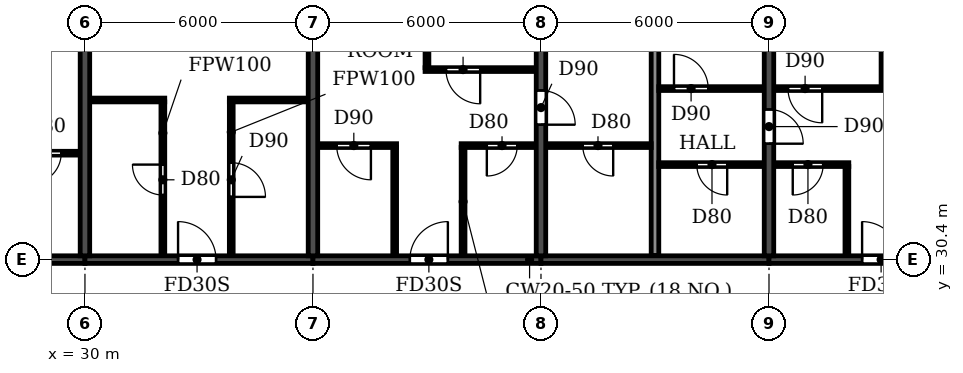
"""IFC4 building model, lengths in metres.
Left out: names, types, materials, properties, quantities, classifications, styles, units other than length and angle.
Written with IfcOpenShell. Run it as: python <this file> out.ifc"""

import sys

from ifc_helpers import new_model, si_unit, direction, frame, frame_2d, origin, place, context, subcontext, project, spatial, rectangle, extrude, element, fill, save


model = new_model("IFC4")
c1 = context("Model", 3, precision=1e-05, world=origin(), true_north=direction((0.0, 1.0)))
c2 = subcontext(c1, "Body", "Model", "MODEL_VIEW")
j1 = project(units=[si_unit("LENGTHUNIT", "METRE"), si_unit("PLANEANGLEUNIT", "RADIAN")], contexts=[c1])
p1 = place(None, origin())
s1 = spatial("IfcSite", under=j1, at=p1, CompositionType="ELEMENT")
p2 = place(p1, origin())
s2 = spatial("IfcBuilding", under=s1, at=p2, CompositionType="ELEMENT")
p3 = place(p2, frame((0.0, 0.0, 201.6)))
s3 = spatial("IfcBuildingStorey", under=s2, at=p3, CompositionType="ELEMENT", Elevation=201.6)
for number, where, z_axis, x_axis in (
    (1, (30.0, 30.5, 0.0), (0.0, 0.0, 1.0), (0.0, 1.0, 0.0)),
    (2, (36.0, 30.5, 0.0), (0.0, 0.0, 1.0), (0.0, 1.0, 0.0)),
):
    element("IfcWall", number, at=place(p3, frame(where, z_axis=z_axis, x_axis=x_axis)), inside=s3, PredefinedType="SHEAR", context=c2, shape_type="SweptSolid", body=[
        extrude(rectangle(XDim=10.5, YDim=0.25, at=frame_2d((5.25, 0.0))), origin(), (0.0, 0.0, 1.0), 3.08),
    ])
p4 = place(p3, frame((42.0, 30.5, 0.0), z_axis=(0.0, 0.0, 1.0), x_axis=(0.0, 1.0, 0.0)))
e3 = element("IfcWall", 3, at=p4, inside=s3, PredefinedType="SHEAR", context=c2, shape_type="SweptSolid", body=[
    extrude(rectangle(XDim=10.5, YDim=0.25, at=frame_2d((5.25, 0.0))), origin(), (0.0, 0.0, 1.0), 3.08),
])
p5 = place(p4, frame((3.45, 0.0, 0.0)))
e4 = element("IfcOpeningElement", 4, at=p5, cuts=e3, PredefinedType="OPENING", context=c2, shape_type="SweptSolid", body=[
    extrude(rectangle(XDim=0.9, YDim=2.1, at=frame_2d((0.45, 1.05))), frame((0.0, 0.135, 0.0), z_axis=(0.0, -1.0, 0.0), x_axis=(1.0, 0.0, 0.0)), (0.0, 0.0, 1.0), 0.27),
])
p6 = place(p3, frame((48.0, 30.5, 0.0), z_axis=(0.0, 0.0, 1.0), x_axis=(0.0, 1.0, 0.0)))
e5 = element("IfcWall", 5, at=p6, inside=s3, PredefinedType="SHEAR", context=c2, shape_type="SweptSolid", body=[
    extrude(rectangle(XDim=10.5, YDim=0.25, at=frame_2d((5.25, 0.0))), origin(), (0.0, 0.0, 1.0), 3.08),
])
p7 = place(p6, frame((2.95, 0.0, 0.0)))
e6 = element("IfcOpeningElement", 6, at=p7, cuts=e5, PredefinedType="OPENING", context=c2, shape_type="SweptSolid", body=[
    extrude(rectangle(XDim=0.9, YDim=2.1, at=frame_2d((0.45, 1.05))), frame((0.0, 0.135, 0.0), z_axis=(0.0, -1.0, 0.0), x_axis=(1.0, 0.0, 0.0)), (0.0, 0.0, 1.0), 0.27),
])
p8 = place(p3, frame((24.0, 30.4, 0.0), z_axis=(0.0, 0.0, 1.0), x_axis=(1.0, 0.0, 0.0)))
e7 = element("IfcWall", 7, at=p8, inside=s3, PredefinedType="SHEAR", context=c2, shape_type="SweptSolid", body=[
    extrude(rectangle(XDim=6.0, YDim=0.2, at=frame_2d((3.0, 0.0))), origin(), (0.0, 0.0, 1.0), 2.48),
])
p9 = place(p8, frame((2.55, 0.0, 0.0)))
e8 = element("IfcOpeningElement", 8, at=p9, cuts=e7, PredefinedType="OPENING", context=c2, shape_type="SweptSolid", body=[
    extrude(rectangle(XDim=1.0, YDim=2.1, at=frame_2d((0.5, 1.05))), frame((0.0, 0.11, 0.0), z_axis=(0.0, -1.0, 0.0), x_axis=(1.0, 0.0, 0.0)), (0.0, 0.0, 1.0), 0.22),
])
p10 = place(p3, frame((30.0, 30.4, 0.0), z_axis=(0.0, 0.0, 1.0), x_axis=(1.0, 0.0, 0.0)))
e9 = element("IfcWall", 9, at=p10, inside=s3, PredefinedType="SHEAR", context=c2, shape_type="SweptSolid", body=[
    extrude(rectangle(XDim=6.0, YDim=0.2, at=frame_2d((3.0, 0.0))), origin(), (0.0, 0.0, 1.0), 2.48),
])
p11 = place(p10, frame((2.45, 0.0, 0.0)))
e10 = element("IfcOpeningElement", 10, at=p11, cuts=e9, PredefinedType="OPENING", context=c2, shape_type="SweptSolid", body=[
    extrude(rectangle(XDim=1.0, YDim=2.1, at=frame_2d((0.5, 1.05))), frame((0.0, 0.11, 0.0), z_axis=(0.0, -1.0, 0.0), x_axis=(1.0, 0.0, 0.0)), (0.0, 0.0, 1.0), 0.22),
])
p12 = place(p3, frame((36.0, 30.4, 0.0), z_axis=(0.0, 0.0, 1.0), x_axis=(1.0, 0.0, 0.0)))
e11 = element("IfcWall", 11, at=p12, inside=s3, PredefinedType="SHEAR", context=c2, shape_type="SweptSolid", body=[
    extrude(rectangle(XDim=6.0, YDim=0.2, at=frame_2d((3.0, 0.0))), origin(), (0.0, 0.0, 1.0), 2.48),
])
p13 = place(p12, frame((2.55, 0.0, 0.0)))
e12 = element("IfcOpeningElement", 12, at=p13, cuts=e11, PredefinedType="OPENING", context=c2, shape_type="SweptSolid", body=[
    extrude(rectangle(XDim=1.0, YDim=2.1, at=frame_2d((0.5, 1.05))), frame((0.0, 0.11, 0.0), z_axis=(0.0, -1.0, 0.0), x_axis=(1.0, 0.0, 0.0)), (0.0, 0.0, 1.0), 0.22),
])
p14 = place(p3, frame((42.0, 30.4, 0.0), z_axis=(0.0, 0.0, 1.0), x_axis=(1.0, 0.0, 0.0)))
e13 = element("IfcWall", 13, at=p14, inside=s3, PredefinedType="SHEAR", context=c2, shape_type="SweptSolid", body=[
    extrude(rectangle(XDim=6.0, YDim=0.2, at=frame_2d((3.0, 0.0))), origin(), (0.0, 0.0, 1.0), 2.48),
])
p15 = place(p3, frame((48.0, 30.4, 0.0), z_axis=(0.0, 0.0, 1.0), x_axis=(1.0, 0.0, 0.0)))
e14 = element("IfcWall", 14, at=p15, inside=s3, PredefinedType="SHEAR", context=c2, shape_type="SweptSolid", body=[
    extrude(rectangle(XDim=6.0, YDim=0.2, at=frame_2d((3.0, 0.0))), origin(), (0.0, 0.0, 1.0), 2.48),
])
p16 = place(p15, frame((2.45, 0.0, 0.0)))
e15 = element("IfcOpeningElement", 15, at=p16, cuts=e14, PredefinedType="OPENING", context=c2, shape_type="SweptSolid", body=[
    extrude(rectangle(XDim=1.0, YDim=2.1, at=frame_2d((0.5, 1.05))), frame((0.0, 0.11, 0.0), z_axis=(0.0, -1.0, 0.0), x_axis=(1.0, 0.0, 0.0)), (0.0, 0.0, 1.0), 0.22),
])
p17 = place(p3, frame((45.0, 30.51, 0.0), z_axis=(0.0, 0.0, 1.0), x_axis=(0.0, 1.0, 0.0)))
e16 = element("IfcWall", 16, at=p17, inside=s3, PredefinedType="PARTITIONING", context=c2, shape_type="SweptSolid", body=[
    extrude(rectangle(XDim=10.63, YDim=0.2, at=frame_2d((5.315, 0.0))), origin(), (0.0, 0.0, 1.0), 3.08),
])
p18 = place(p3, frame((45.1, 32.9, 0.0), z_axis=(0.0, 0.0, 1.0), x_axis=(1.0, 0.0, 0.0)))
e17 = element("IfcWall", 17, at=p18, inside=s3, PredefinedType="PARTITIONING", context=c2, shape_type="SweptSolid", body=[
    extrude(rectangle(XDim=2.765, YDim=0.1, at=frame_2d((1.382, 0.0))), origin(), (0.0, 0.0, 1.0), 3.08),
])
p19 = place(p18, frame((1.0, 0.0, 0.0)))
e18 = element("IfcOpeningElement", 18, at=p19, cuts=e17, PredefinedType="OPENING", context=c2, shape_type="SweptSolid", body=[
    extrude(rectangle(XDim=0.8, YDim=2.1, at=frame_2d((0.4, 1.05))), frame((0.0, 0.06, 0.0), z_axis=(0.0, -1.0, 0.0), x_axis=(1.0, 0.0, 0.0)), (0.0, 0.0, 1.0), 0.12),
])
p20 = place(p3, frame((48.135, 32.9, 0.0), z_axis=(0.0, 0.0, 1.0), x_axis=(1.0, 0.0, 0.0)))
e19 = element("IfcWall", 19, at=p20, inside=s3, PredefinedType="PARTITIONING", context=c2, shape_type="SweptSolid", body=[
    extrude(rectangle(XDim=1.965, YDim=0.1, at=frame_2d((0.982, 0.0))), origin(), (0.0, 0.0, 1.0), 3.08),
])
p21 = place(p20, frame((0.49, 0.0, 0.0)))
e20 = element("IfcOpeningElement", 20, at=p21, cuts=e19, PredefinedType="OPENING", context=c2, shape_type="SweptSolid", body=[
    extrude(rectangle(XDim=0.8, YDim=2.1, at=frame_2d((0.4, 1.05))), frame((0.0, 0.06, 0.0), z_axis=(0.0, -1.0, 0.0), x_axis=(1.0, 0.0, 0.0)), (0.0, 0.0, 1.0), 0.12),
])
p22 = place(p3, frame((27.9, 33.2, 0.0), z_axis=(0.0, 0.0, 1.0), x_axis=(1.0, 0.0, 0.0)))
e21 = element("IfcWall", 21, at=p22, inside=s3, PredefinedType="PARTITIONING", context=c2, shape_type="SweptSolid", body=[
    extrude(rectangle(XDim=1.965, YDim=0.1, at=frame_2d((0.982, 0.0))), origin(), (0.0, 0.0, 1.0), 3.08),
])
p23 = place(p22, frame((0.675, 0.0, 0.0)))
e22 = element("IfcOpeningElement", 22, at=p23, cuts=e21, PredefinedType="OPENING", context=c2, shape_type="SweptSolid", body=[
    extrude(rectangle(XDim=0.8, YDim=2.1, at=frame_2d((0.4, 1.05))), frame((0.0, 0.06, 0.0), z_axis=(0.0, -1.0, 0.0), x_axis=(1.0, 0.0, 0.0)), (0.0, 0.0, 1.0), 0.12),
])
p24 = place(p3, frame((36.135, 33.4, 0.0), z_axis=(0.0, 0.0, 1.0), x_axis=(1.0, 0.0, 0.0)))
e23 = element("IfcWall", 23, at=p24, inside=s3, PredefinedType="PARTITIONING", context=c2, shape_type="SweptSolid", body=[
    extrude(rectangle(XDim=2.065, YDim=0.1, at=frame_2d((1.032, 0.0))), origin(), (0.0, 0.0, 1.0), 3.08),
])
p25 = place(p24, frame((0.49, 0.0, 0.0)))
e24 = element("IfcOpeningElement", 24, at=p25, cuts=e23, PredefinedType="OPENING", context=c2, shape_type="SweptSolid", body=[
    extrude(rectangle(XDim=0.9, YDim=2.1, at=frame_2d((0.45, 1.05))), frame((0.0, 0.06, 0.0), z_axis=(0.0, -1.0, 0.0), x_axis=(1.0, 0.0, 0.0)), (0.0, 0.0, 1.0), 0.12),
])
p26 = place(p3, frame((39.9, 33.4, 0.0), z_axis=(0.0, 0.0, 1.0), x_axis=(1.0, 0.0, 0.0)))
e25 = element("IfcWall", 25, at=p26, inside=s3, PredefinedType="PARTITIONING", context=c2, shape_type="SweptSolid", body=[
    extrude(rectangle(XDim=1.965, YDim=0.1, at=frame_2d((0.982, 0.0))), origin(), (0.0, 0.0, 1.0), 3.08),
])
p27 = place(p26, frame((0.675, 0.0, 0.0)))
e26 = element("IfcOpeningElement", 26, at=p27, cuts=e25, PredefinedType="OPENING", context=c2, shape_type="SweptSolid", body=[
    extrude(rectangle(XDim=0.8, YDim=2.1, at=frame_2d((0.4, 1.05))), frame((0.0, 0.06, 0.0), z_axis=(0.0, -1.0, 0.0), x_axis=(1.0, 0.0, 0.0)), (0.0, 0.0, 1.0), 0.12),
])
p28 = place(p3, frame((42.135, 33.4, 0.0), z_axis=(0.0, 0.0, 1.0), x_axis=(1.0, 0.0, 0.0)))
e27 = element("IfcWall", 27, at=p28, inside=s3, PredefinedType="PARTITIONING", context=c2, shape_type="SweptSolid", body=[
    extrude(rectangle(XDim=2.765, YDim=0.1, at=frame_2d((1.382, 0.0))), origin(), (0.0, 0.0, 1.0), 3.08),
])
p29 = place(p28, frame((0.965, 0.0, 0.0)))
e28 = element("IfcOpeningElement", 28, at=p29, cuts=e27, PredefinedType="OPENING", context=c2, shape_type="SweptSolid", body=[
    extrude(rectangle(XDim=0.8, YDim=2.1, at=frame_2d((0.4, 1.05))), frame((0.0, 0.06, 0.0), z_axis=(0.0, -1.0, 0.0), x_axis=(1.0, 0.0, 0.0)), (0.0, 0.0, 1.0), 0.12),
])
p30 = place(p3, frame((30.135, 34.6, 0.0), z_axis=(0.0, 0.0, 1.0), x_axis=(1.0, 0.0, 0.0)))
e29 = element("IfcWall", 29, at=p30, inside=s3, PredefinedType="PARTITIONING", context=c2, shape_type="SweptSolid", body=[
    extrude(rectangle(XDim=1.965, YDim=0.1, at=frame_2d((0.982, 0.0))), origin(), (0.0, 0.0, 1.0), 3.08),
])
p31 = place(p3, frame((33.8, 34.6, 0.0), z_axis=(0.0, 0.0, 1.0), x_axis=(1.0, 0.0, 0.0)))
e30 = element("IfcWall", 30, at=p31, inside=s3, PredefinedType="PARTITIONING", context=c2, shape_type="SweptSolid", body=[
    extrude(rectangle(XDim=2.065, YDim=0.1, at=frame_2d((1.032, 0.0))), origin(), (0.0, 0.0, 1.0), 3.08),
])
p32 = place(p3, frame((45.1, 34.9, 0.0), z_axis=(0.0, 0.0, 1.0), x_axis=(1.0, 0.0, 0.0)))
e31 = element("IfcWall", 31, at=p32, inside=s3, PredefinedType="PARTITIONING", context=c2, shape_type="SweptSolid", body=[
    extrude(rectangle(XDim=2.765, YDim=0.1, at=frame_2d((1.382, 0.0))), origin(), (0.0, 0.0, 1.0), 3.08),
])
p33 = place(p32, frame((0.4, 0.0, 0.0)))
e32 = element("IfcOpeningElement", 32, at=p33, cuts=e31, PredefinedType="OPENING", context=c2, shape_type="SweptSolid", body=[
    extrude(rectangle(XDim=0.9, YDim=2.1, at=frame_2d((0.45, 1.05))), frame((0.0, 0.06, 0.0), z_axis=(0.0, -1.0, 0.0), x_axis=(1.0, 0.0, 0.0)), (0.0, 0.0, 1.0), 0.12),
])
p34 = place(p3, frame((48.135, 34.9, 0.0), z_axis=(0.0, 0.0, 1.0), x_axis=(1.0, 0.0, 0.0)))
e33 = element("IfcWall", 33, at=p34, inside=s3, PredefinedType="PARTITIONING", context=c2, shape_type="SweptSolid", body=[
    extrude(rectangle(XDim=2.915, YDim=0.1, at=frame_2d((1.458, 0.0))), origin(), (0.0, 0.0, 1.0), 3.08),
])
p35 = place(p34, frame((0.365, 0.0, 0.0)))
e34 = element("IfcOpeningElement", 34, at=p35, cuts=e33, PredefinedType="OPENING", context=c2, shape_type="SweptSolid", body=[
    extrude(rectangle(XDim=0.9, YDim=2.1, at=frame_2d((0.45, 1.05))), frame((0.0, 0.06, 0.0), z_axis=(0.0, -1.0, 0.0), x_axis=(1.0, 0.0, 0.0)), (0.0, 0.0, 1.0), 0.12),
])
p36 = place(p3, frame((38.95, 35.4, 0.0), z_axis=(0.0, 0.0, 1.0), x_axis=(1.0, 0.0, 0.0)))
e35 = element("IfcWall", 35, at=p36, inside=s3, PredefinedType="PARTITIONING", context=c2, shape_type="SweptSolid", body=[
    extrude(rectangle(XDim=2.915, YDim=0.1, at=frame_2d((1.458, 0.0))), origin(), (0.0, 0.0, 1.0), 3.08),
])
p37 = place(p36, frame((0.55, 0.0, 0.0)))
e36 = element("IfcOpeningElement", 36, at=p37, cuts=e35, PredefinedType="OPENING", context=c2, shape_type="SweptSolid", body=[
    extrude(rectangle(XDim=0.9, YDim=2.1, at=frame_2d((0.45, 1.05))), frame((0.0, 0.06, 0.0), z_axis=(0.0, -1.0, 0.0), x_axis=(1.0, 0.0, 0.0)), (0.0, 0.0, 1.0), 0.12),
])
p38 = place(p3, frame((32.05, 30.51, 0.0), z_axis=(0.0, 0.0, 1.0), x_axis=(0.0, 1.0, 0.0)))
e37 = element("IfcWall", 37, at=p38, inside=s3, PredefinedType="PARTITIONING", context=c2, shape_type="SweptSolid", body=[
    extrude(rectangle(XDim=4.04, YDim=0.1, at=frame_2d((2.02, 0.0))), origin(), (0.0, 0.0, 1.0), 3.08),
])
p39 = place(p38, frame((1.59, 0.0, 0.0)))
e38 = element("IfcOpeningElement", 38, at=p39, cuts=e37, PredefinedType="OPENING", context=c2, shape_type="SweptSolid", body=[
    extrude(rectangle(XDim=0.8, YDim=2.1, at=frame_2d((0.4, 1.05))), frame((0.0, 0.06, 0.0), z_axis=(0.0, -1.0, 0.0), x_axis=(1.0, 0.0, 0.0)), (0.0, 0.0, 1.0), 0.12),
])
p40 = place(p3, frame((33.85, 30.51, 0.0), z_axis=(0.0, 0.0, 1.0), x_axis=(0.0, 1.0, 0.0)))
e39 = element("IfcWall", 39, at=p40, inside=s3, PredefinedType="PARTITIONING", context=c2, shape_type="SweptSolid", body=[
    extrude(rectangle(XDim=4.04, YDim=0.1, at=frame_2d((2.02, 0.0))), origin(), (0.0, 0.0, 1.0), 3.08),
])
p41 = place(p40, frame((1.54, 0.0, 0.0)))
e40 = element("IfcOpeningElement", 40, at=p41, cuts=e39, PredefinedType="OPENING", context=c2, shape_type="SweptSolid", body=[
    extrude(rectangle(XDim=0.9, YDim=2.1, at=frame_2d((0.45, 1.05))), frame((0.0, 0.06, 0.0), z_axis=(0.0, -1.0, 0.0), x_axis=(1.0, 0.0, 0.0)), (0.0, 0.0, 1.0), 0.12),
])
p42 = place(p3, frame((38.15, 30.51, 0.0), z_axis=(0.0, 0.0, 1.0), x_axis=(0.0, 1.0, 0.0)))
e41 = element("IfcWall", 41, at=p42, inside=s3, PredefinedType="PARTITIONING", context=c2, shape_type="SweptSolid", body=[
    extrude(rectangle(XDim=2.84, YDim=0.1, at=frame_2d((1.42, 0.0))), origin(), (0.0, 0.0, 1.0), 3.08),
])
p43 = place(p3, frame((39.0, 35.45, 0.0), z_axis=(0.0, 0.0, 1.0), x_axis=(0.0, 1.0, 0.0)))
e42 = element("IfcWall", 42, at=p43, inside=s3, PredefinedType="PARTITIONING", context=c2, shape_type="SweptSolid", body=[
    extrude(rectangle(XDim=5.69, YDim=0.1, at=frame_2d((2.845, 0.0))), origin(), (0.0, 0.0, 1.0), 3.08),
])
p44 = place(p3, frame((39.95, 30.51, 0.0), z_axis=(0.0, 0.0, 1.0), x_axis=(0.0, 1.0, 0.0)))
e43 = element("IfcWall", 43, at=p44, inside=s3, PredefinedType="PARTITIONING", context=c2, shape_type="SweptSolid", body=[
    extrude(rectangle(XDim=2.84, YDim=0.1, at=frame_2d((1.42, 0.0))), origin(), (0.0, 0.0, 1.0), 3.08),
])
p45 = place(p3, frame((50.05, 30.51, 0.0), z_axis=(0.0, 0.0, 1.0), x_axis=(0.0, 1.0, 0.0)))
e44 = element("IfcWall", 44, at=p45, inside=s3, PredefinedType="PARTITIONING", context=c2, shape_type="SweptSolid", body=[
    extrude(rectangle(XDim=2.34, YDim=0.1, at=frame_2d((1.17, 0.0))), origin(), (0.0, 0.0, 1.0), 3.08),
])
p46 = place(p3, frame((51.0, 34.95, 0.0), z_axis=(0.0, 0.0, 1.0), x_axis=(0.0, 1.0, 0.0)))
e45 = element("IfcWall", 45, at=p46, inside=s3, PredefinedType="PARTITIONING", context=c2, shape_type="SweptSolid", body=[
    extrude(rectangle(XDim=6.19, YDim=0.1, at=frame_2d((3.095, 0.0))), origin(), (0.0, 0.0, 1.0), 3.08),
])
p47 = place(p23, frame((0.8, 0.0, 0.0), z_axis=(0.0, 0.0, 1.0), x_axis=(-1.0, 0.0, 0.0)))
e46 = element("IfcDoor", 46, at=p47, inside=s3, OperationType="SINGLE_SWING_RIGHT", PredefinedType="DOOR", context=c2, shape_type="SweptSolid", body=[
    extrude(rectangle(XDim=0.8, YDim=2.1, at=frame_2d((0.4, 1.05))), frame((0.0, 0.025, 0.0), z_axis=(0.0, -1.0, 0.0), x_axis=(1.0, 0.0, 0.0)), (0.0, 0.0, 1.0), 0.05),
])
fill(e22, e46)
p48 = place(p39, origin())
e47 = element("IfcDoor", 47, at=p48, inside=s3, OperationType="SINGLE_SWING_RIGHT", PredefinedType="DOOR", context=c2, shape_type="SweptSolid", body=[
    extrude(rectangle(XDim=0.8, YDim=2.1, at=frame_2d((0.4, 1.05))), frame((0.0, 0.025, 0.0), z_axis=(0.0, -1.0, 0.0), x_axis=(1.0, 0.0, 0.0)), (0.0, 0.0, 1.0), 0.05),
])
fill(e38, e47)
p49 = place(p11, origin())
e48 = element("IfcDoor", 48, at=p49, inside=s3, OperationType="SINGLE_SWING_LEFT", PredefinedType="DOOR", context=c2, shape_type="SweptSolid", body=[
    extrude(rectangle(XDim=1.0, YDim=2.1, at=frame_2d((0.5, 1.05))), frame((0.0, 0.025, 0.0), z_axis=(0.0, -1.0, 0.0), x_axis=(1.0, 0.0, 0.0)), (0.0, 0.0, 1.0), 0.05),
])
fill(e10, e48)
p50 = place(p41, frame((0.9, 0.0, 0.0), z_axis=(0.0, 0.0, 1.0), x_axis=(-1.0, 0.0, 0.0)))
e49 = element("IfcDoor", 49, at=p50, inside=s3, OperationType="SINGLE_SWING_RIGHT", PredefinedType="DOOR", context=c2, shape_type="SweptSolid", body=[
    extrude(rectangle(XDim=0.9, YDim=2.1, at=frame_2d((0.45, 1.05))), frame((0.0, 0.025, 0.0), z_axis=(0.0, -1.0, 0.0), x_axis=(1.0, 0.0, 0.0)), (0.0, 0.0, 1.0), 0.05),
])
fill(e40, e49)
p51 = place(p29, frame((0.8, 0.0, 0.0), z_axis=(0.0, 0.0, 1.0), x_axis=(-1.0, 0.0, 0.0)))
e50 = element("IfcDoor", 50, at=p51, inside=s3, OperationType="SINGLE_SWING_LEFT", PredefinedType="DOOR", context=c2, shape_type="SweptSolid", body=[
    extrude(rectangle(XDim=0.8, YDim=2.1, at=frame_2d((0.4, 1.05))), frame((0.0, 0.025, 0.0), z_axis=(0.0, -1.0, 0.0), x_axis=(1.0, 0.0, 0.0)), (0.0, 0.0, 1.0), 0.05),
])
fill(e28, e50)
p52 = place(p25, frame((0.9, 0.0, 0.0), z_axis=(0.0, 0.0, 1.0), x_axis=(-1.0, 0.0, 0.0)))
e51 = element("IfcDoor", 51, at=p52, inside=s3, OperationType="SINGLE_SWING_LEFT", PredefinedType="DOOR", context=c2, shape_type="SweptSolid", body=[
    extrude(rectangle(XDim=0.9, YDim=2.1, at=frame_2d((0.45, 1.05))), frame((0.0, 0.025, 0.0), z_axis=(0.0, -1.0, 0.0), x_axis=(1.0, 0.0, 0.0)), (0.0, 0.0, 1.0), 0.05),
])
fill(e24, e51)
p53 = place(p13, origin())
e52 = element("IfcDoor", 52, at=p53, inside=s3, OperationType="SINGLE_SWING_RIGHT", PredefinedType="DOOR", context=c2, shape_type="SweptSolid", body=[
    extrude(rectangle(XDim=1.0, YDim=2.1, at=frame_2d((0.5, 1.05))), frame((0.0, 0.025, 0.0), z_axis=(0.0, -1.0, 0.0), x_axis=(1.0, 0.0, 0.0)), (0.0, 0.0, 1.0), 0.05),
])
fill(e12, e52)
p54 = place(p37, frame((0.9, 0.0, 0.0), z_axis=(0.0, 0.0, 1.0), x_axis=(-1.0, 0.0, 0.0)))
e53 = element("IfcDoor", 53, at=p54, inside=s3, OperationType="SINGLE_SWING_LEFT", PredefinedType="DOOR", context=c2, shape_type="SweptSolid", body=[
    extrude(rectangle(XDim=0.9, YDim=2.1, at=frame_2d((0.45, 1.05))), frame((0.0, 0.025, 0.0), z_axis=(0.0, -1.0, 0.0), x_axis=(1.0, 0.0, 0.0)), (0.0, 0.0, 1.0), 0.05),
])
fill(e36, e53)
p55 = place(p27, frame((0.8, 0.0, 0.0), z_axis=(0.0, 0.0, 1.0), x_axis=(-1.0, 0.0, 0.0)))
e54 = element("IfcDoor", 54, at=p55, inside=s3, OperationType="SINGLE_SWING_RIGHT", PredefinedType="DOOR", context=c2, shape_type="SweptSolid", body=[
    extrude(rectangle(XDim=0.8, YDim=2.1, at=frame_2d((0.4, 1.05))), frame((0.0, 0.025, 0.0), z_axis=(0.0, -1.0, 0.0), x_axis=(1.0, 0.0, 0.0)), (0.0, 0.0, 1.0), 0.05),
])
fill(e26, e54)
p56 = place(p5, frame((0.9, 0.0, 0.0), z_axis=(0.0, 0.0, 1.0), x_axis=(-1.0, 0.0, 0.0)))
e55 = element("IfcDoor", 55, at=p56, inside=s3, OperationType="SINGLE_SWING_RIGHT", PredefinedType="DOOR", context=c2, shape_type="SweptSolid", body=[
    extrude(rectangle(XDim=0.9, YDim=2.1, at=frame_2d((0.45, 1.05))), frame((0.0, 0.025, 0.0), z_axis=(0.0, -1.0, 0.0), x_axis=(1.0, 0.0, 0.0)), (0.0, 0.0, 1.0), 0.05),
])
fill(e4, e55)
p57 = place(p33, origin())
e56 = element("IfcDoor", 56, at=p57, inside=s3, OperationType="SINGLE_SWING_LEFT", PredefinedType="DOOR", context=c2, shape_type="SweptSolid", body=[
    extrude(rectangle(XDim=0.9, YDim=2.1, at=frame_2d((0.45, 1.05))), frame((0.0, 0.025, 0.0), z_axis=(0.0, -1.0, 0.0), x_axis=(1.0, 0.0, 0.0)), (0.0, 0.0, 1.0), 0.05),
])
fill(e32, e56)
p58 = place(p19, frame((0.8, 0.0, 0.0), z_axis=(0.0, 0.0, 1.0), x_axis=(-1.0, 0.0, 0.0)))
e57 = element("IfcDoor", 57, at=p58, inside=s3, OperationType="SINGLE_SWING_LEFT", PredefinedType="DOOR", context=c2, shape_type="SweptSolid", body=[
    extrude(rectangle(XDim=0.8, YDim=2.1, at=frame_2d((0.4, 1.05))), frame((0.0, 0.025, 0.0), z_axis=(0.0, -1.0, 0.0), x_axis=(1.0, 0.0, 0.0)), (0.0, 0.0, 1.0), 0.05),
])
fill(e18, e57)
p59 = place(p7, frame((0.9, 0.0, 0.0), z_axis=(0.0, 0.0, 1.0), x_axis=(-1.0, 0.0, 0.0)))
e58 = element("IfcDoor", 58, at=p59, inside=s3, OperationType="SINGLE_SWING_RIGHT", PredefinedType="DOOR", context=c2, shape_type="SweptSolid", body=[
    extrude(rectangle(XDim=0.9, YDim=2.1, at=frame_2d((0.45, 1.05))), frame((0.0, 0.025, 0.0), z_axis=(0.0, -1.0, 0.0), x_axis=(1.0, 0.0, 0.0)), (0.0, 0.0, 1.0), 0.05),
])
fill(e6, e58)
p60 = place(p35, frame((0.9, 0.0, 0.0), z_axis=(0.0, 0.0, 1.0), x_axis=(-1.0, 0.0, 0.0)))
e59 = element("IfcDoor", 59, at=p60, inside=s3, OperationType="SINGLE_SWING_LEFT", PredefinedType="DOOR", context=c2, shape_type="SweptSolid", body=[
    extrude(rectangle(XDim=0.9, YDim=2.1, at=frame_2d((0.45, 1.05))), frame((0.0, 0.025, 0.0), z_axis=(0.0, -1.0, 0.0), x_axis=(1.0, 0.0, 0.0)), (0.0, 0.0, 1.0), 0.05),
])
fill(e34, e59)
p61 = place(p21, frame((0.8, 0.0, 0.0), z_axis=(0.0, 0.0, 1.0), x_axis=(-1.0, 0.0, 0.0)))
e60 = element("IfcDoor", 60, at=p61, inside=s3, OperationType="SINGLE_SWING_RIGHT", PredefinedType="DOOR", context=c2, shape_type="SweptSolid", body=[
    extrude(rectangle(XDim=0.8, YDim=2.1, at=frame_2d((0.4, 1.05))), frame((0.0, 0.025, 0.0), z_axis=(0.0, -1.0, 0.0), x_axis=(1.0, 0.0, 0.0)), (0.0, 0.0, 1.0), 0.05),
])
fill(e20, e60)
p62 = place(p16, origin())
e61 = element("IfcDoor", 61, at=p62, inside=s3, OperationType="SINGLE_SWING_LEFT", PredefinedType="DOOR", context=c2, shape_type="SweptSolid", body=[
    extrude(rectangle(XDim=1.0, YDim=2.1, at=frame_2d((0.5, 1.05))), frame((0.0, 0.025, 0.0), z_axis=(0.0, -1.0, 0.0), x_axis=(1.0, 0.0, 0.0)), (0.0, 0.0, 1.0), 0.05),
])
fill(e15, e61)
save(model, sys.argv[1])
